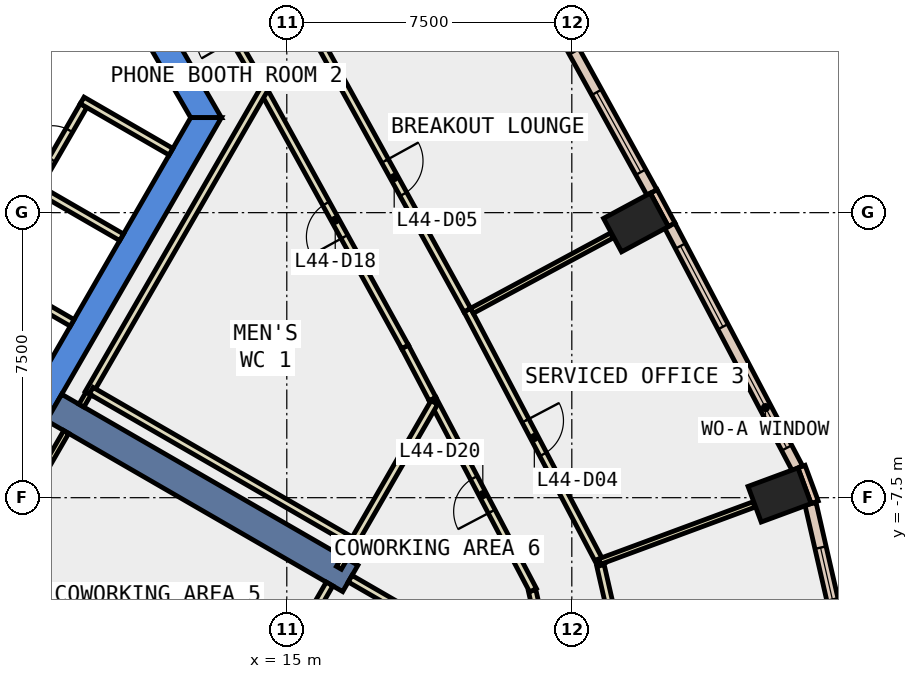
"""IFC4 building model, lengths in metres.
Left out: names, types, materials, properties, quantities, classifications, styles, units other than length and angle.
Written with IfcOpenShell. Run it as: python <this file> out.ifc"""

import sys

from ifc_helpers import new_model, si_unit, direction, frame, frame_2d, origin, origin_2d, place, context, subcontext, project, spatial, polyline, rectangle, outline, extrude, element, fill, save


model = new_model("IFC4")
c1 = context("Model", 3, precision=1e-05, world=origin(), true_north=direction((0.0, 1.0)))
c2 = subcontext(c1, "Body", "Model", "MODEL_VIEW")
j1 = project(units=[si_unit("LENGTHUNIT", "METRE"), si_unit("PLANEANGLEUNIT", "RADIAN")], contexts=[c1])
p1 = place(None, origin())
s1 = spatial("IfcSite", under=j1, at=p1, CompositionType="ELEMENT")
p2 = place(p1, origin())
s2 = spatial("IfcBuilding", under=s1, at=p2, CompositionType="ELEMENT")
p3 = place(p2, frame((0.0, 0.0, 198.2)))
s3 = spatial("IfcBuildingStorey", under=s2, at=p3, CompositionType="ELEMENT", Elevation=198.2)
for number, where, z_axis, x_axis in (
    (1, (27.967, -7.429, -0.4), (0.0, 0.0, 1.0), (-0.347, 0.938, 0.0)),
    (2, (24.188, -0.259, -0.4), (0.0, 0.0, 1.0), (-0.474, 0.88, 0.0)),
):
    element("IfcColumn", number, at=place(p3, frame(where, z_axis=z_axis, x_axis=x_axis)), inside=s3, PredefinedType="COLUMN", context=c2, shape_type="SweptSolid", body=[
        extrude(rectangle(XDim=1.0, YDim=1.4, at=origin_2d()), origin(), (0.0, 0.0, 1.0), 4.2),
    ])
p4 = place(p3, frame((0.0, 0.0, -0.4)))
e3 = element("IfcWall", 3, at=p4, inside=s3, PredefinedType="SHEAR", context=c2, shape_type="SweptSolid", body=[
    extrude(outline(polyline([(8.084, 11.498), (7.478, 11.148), (12.471, 2.5), (13.279, 2.5), (8.084, 11.498)])), origin(), (0.0, 0.0, 1.0), 4.2),
])
p5 = place(p3, frame((0.0, 0.0, -0.4)))
e4 = element("IfcWall", 4, at=p5, inside=s3, PredefinedType="SHEAR", context=c2, shape_type="SweptSolid", body=[
    extrude(outline(polyline([(6.64, -9.0), (13.279, 2.5), (12.471, 2.5), (6.235, -8.3), (6.64, -9.0)])), origin(), (0.0, 0.0, 1.0), 4.2),
])
p6 = place(p3, frame((8.877, -5.125, -0.4), z_axis=(0.0, 0.0, 1.0), x_axis=(0.866017533419, -0.500013631625, 0.0)))
e5 = element("IfcWall", 5, at=p6, inside=s3, PredefinedType="SHEAR", context=c2, shape_type="SweptSolid", body=[
    extrude(rectangle(XDim=9.0, YDim=0.8, at=frame_2d((4.5, 0.0))), origin(), (0.0, 0.0, 1.0), 4.2),
])
p7 = place(p3, frame((28.891, -7.621, 0.0), z_axis=(0.0, 0.0, 1.0), x_axis=(-0.347107644204, 0.937825294677, 0.0)))
e6 = element("IfcWall", 6, at=p7, inside=s3, PredefinedType="STANDARD", context=c2, shape_type="SweptSolid", body=[
    extrude(rectangle(XDim=1.0, YDim=0.2, at=frame_2d((0.5, 0.0))), origin(), (0.0, 0.0, 1.0), 3.8),
])
p8 = place(p3, frame((25.129, -0.32, 0.0), z_axis=(0.0, 0.0, 1.0), x_axis=(-0.473663196434, 0.88070606694, 0.0)))
e7 = element("IfcWall", 7, at=p8, inside=s3, PredefinedType="STANDARD", context=c2, shape_type="SweptSolid", body=[
    extrude(rectangle(XDim=1.0, YDim=0.2, at=frame_2d((0.5, 0.0))), origin(), (0.0, 0.0, 1.0), 3.8),
])
p9 = place(p3, frame((29.621, -11.332, 0.0), z_axis=(0.0, 0.0, 1.0), x_axis=(-0.223013094864, 0.974815448954, 0.0)))
e8 = element("IfcWall", 8, at=p9, inside=s3, PredefinedType="STANDARD", context=c2, shape_type="SweptSolid", body=[
    extrude(rectangle(XDim=3.767, YDim=0.3, at=frame_2d((1.884, 0.0))), origin(), (0.0, 0.0, 1.0), 3.8),
])
p10 = place(p9, frame((1.183, 0.0, 0.9)))
e9 = element("IfcOpeningElement", 9, at=p10, cuts=e8, PredefinedType="OPENING", context=c2, shape_type="SweptSolid", body=[
    extrude(rectangle(XDim=1.4, YDim=2.6, at=frame_2d((0.7, 1.3))), frame((0.0, 0.16, 0.0), z_axis=(0.0, -1.0, 0.0), x_axis=(1.0, 0.0, 0.0)), (0.0, 0.0, 1.0), 0.32),
])
p11 = place(p3, frame((28.435, -6.724, 0.0), z_axis=(0.0, 0.0, 1.0), x_axis=(-0.465478369088, 0.885059256723, 0.0)))
e10 = element("IfcWall", 10, at=p11, inside=s3, PredefinedType="STANDARD", context=c2, shape_type="SweptSolid", body=[
    extrude(rectangle(XDim=7.208, YDim=0.3, at=frame_2d((3.604, 0.0))), origin(), (0.0, 0.0, 1.0), 3.8),
])
p12 = place(p11, frame((0.602, 0.0, 0.9)))
e11 = element("IfcOpeningElement", 11, at=p12, cuts=e10, PredefinedType="OPENING", context=c2, shape_type="SweptSolid", body=[
    extrude(rectangle(XDim=2.4, YDim=2.6, at=frame_2d((1.2, 1.3))), frame((0.0, 0.16, 0.0), z_axis=(0.0, -1.0, 0.0), x_axis=(1.0, 0.0, 0.0)), (0.0, 0.0, 1.0), 0.32),
])
p13 = place(p11, frame((4.206, 0.0, 0.9)))
e12 = element("IfcOpeningElement", 12, at=p13, cuts=e10, PredefinedType="OPENING", context=c2, shape_type="SweptSolid", body=[
    extrude(rectangle(XDim=2.4, YDim=2.6, at=frame_2d((1.2, 1.3))), frame((0.0, 0.16, 0.0), z_axis=(0.0, -1.0, 0.0), x_axis=(1.0, 0.0, 0.0)), (0.0, 0.0, 1.0), 0.32),
])
p14 = place(p3, frame((24.607, 0.534, 0.0), z_axis=(0.0, 0.0, 1.0), x_axis=(-0.482862185961, 0.875696356832, 0.0)))
e13 = element("IfcWall", 13, at=p14, inside=s3, PredefinedType="STANDARD", context=c2, shape_type="SweptSolid", body=[
    extrude(rectangle(XDim=7.23, YDim=0.3, at=frame_2d((3.615, 0.0))), origin(), (0.0, 0.0, 1.0), 3.8),
])
p15 = place(p14, frame((0.607, 0.0, 0.9)))
e14 = element("IfcOpeningElement", 14, at=p15, cuts=e13, PredefinedType="OPENING", context=c2, shape_type="SweptSolid", body=[
    extrude(rectangle(XDim=2.4, YDim=2.6, at=frame_2d((1.2, 1.3))), frame((0.0, 0.16, 0.0), z_axis=(0.0, -1.0, 0.0), x_axis=(1.0, 0.0, 0.0)), (0.0, 0.0, 1.0), 0.32),
])
p16 = place(p14, frame((4.222, 0.0, 0.9)))
e15 = element("IfcOpeningElement", 15, at=p16, cuts=e13, PredefinedType="OPENING", context=c2, shape_type="SweptSolid", body=[
    extrude(rectangle(XDim=2.4, YDim=2.6, at=frame_2d((1.2, 1.3))), frame((0.0, 0.16, 0.0), z_axis=(0.0, -1.0, 0.0), x_axis=(1.0, 0.0, 0.0)), (0.0, 0.0, 1.0), 0.32),
])
p17 = place(p3, frame((14.213, 3.543, 0.0), z_axis=(0.0, 0.0, 1.0), x_axis=(-0.500182898346, 0.865919781621, 0.0)))
e16 = element("IfcWall", 16, at=p17, inside=s3, PredefinedType="PARTITIONING", context=c2, shape_type="SweptSolid", body=[
    extrude(rectangle(XDim=3.35, YDim=0.2, at=frame_2d((1.675, 0.0))), origin(), (0.0, 0.0, 1.0), 3.8),
])
p18 = place(p17, frame((1.175, 0.0, 0.0)))
e17 = element("IfcOpeningElement", 17, at=p18, cuts=e16, PredefinedType="OPENING", context=c2, shape_type="SweptSolid", body=[
    extrude(rectangle(XDim=1.0, YDim=2.1, at=frame_2d((0.5, 1.05))), frame((0.0, 0.11, 0.0), z_axis=(0.0, -1.0, 0.0), x_axis=(1.0, 0.0, 0.0)), (0.0, 0.0, 1.0), 0.22),
])
p19 = place(p3, frame((18.836, -4.906, 0.0), z_axis=(0.0, 0.0, 1.0), x_axis=(-0.465843561357, 0.884867095299, 0.0)))
e18 = element("IfcWall", 18, at=p19, inside=s3, PredefinedType="PARTITIONING", context=c2, shape_type="SweptSolid", body=[
    extrude(rectangle(XDim=1.554, YDim=0.2, at=frame_2d((0.777, 0.0))), origin(), (0.0, 0.0, 1.0), 3.8),
])
p20 = place(p3, frame((18.112, -3.531, 0.0), z_axis=(0.0, 0.0, 1.0), x_axis=(-0.482800061144, 0.875730609811, 0.0)))
e19 = element("IfcWall", 19, at=p20, inside=s3, PredefinedType="PARTITIONING", context=c2, shape_type="SweptSolid", body=[
    extrude(rectangle(XDim=7.612, YDim=0.2, at=frame_2d((3.806, 0.0))), origin(), (0.0, 0.0, 1.0), 3.8),
])
p21 = place(p20, frame((3.306, 0.0, 0.0)))
e20 = element("IfcOpeningElement", 20, at=p21, cuts=e19, PredefinedType="OPENING", context=c2, shape_type="SweptSolid", body=[
    extrude(rectangle(XDim=1.0, YDim=2.1, at=frame_2d((0.5, 1.05))), frame((0.0, 0.11, 0.0), z_axis=(0.0, -1.0, 0.0), x_axis=(1.0, 0.0, 0.0)), (0.0, 0.0, 1.0), 0.22),
])
p22 = place(p3, frame((21.866, -11.737, 0.0), z_axis=(0.0, 0.0, 1.0), x_axis=(-0.222871656966, 0.974847795567, 0.0)))
e21 = element("IfcWall", 21, at=p22, inside=s3, PredefinedType="PARTITIONING", context=c2, shape_type="SweptSolid", body=[
    extrude(rectangle(XDim=1.839, YDim=0.2, at=frame_2d((0.919, 0.0))), origin(), (0.0, 0.0, 1.0), 3.8),
])
p23 = place(p3, frame((21.48, -9.935, 0.0), z_axis=(0.0, 0.0, 1.0), x_axis=(-0.465356775138, 0.885123195851, 0.0)))
e22 = element("IfcWall", 22, at=p23, inside=s3, PredefinedType="PARTITIONING", context=c2, shape_type="SweptSolid", body=[
    extrude(rectangle(XDim=5.682, YDim=0.2, at=frame_2d((2.841, 0.0))), origin(), (0.0, 0.0, 1.0), 3.8),
])
p24 = place(p23, frame((2.341, 0.0, 0.0)))
e23 = element("IfcOpeningElement", 23, at=p24, cuts=e22, PredefinedType="OPENING", context=c2, shape_type="SweptSolid", body=[
    extrude(rectangle(XDim=1.0, YDim=2.1, at=frame_2d((0.5, 1.05))), frame((0.0, 0.11, 0.0), z_axis=(0.0, -1.0, 0.0), x_axis=(1.0, 0.0, 0.0)), (0.0, 0.0, 1.0), 0.22),
])
p25 = place(p3, frame((23.253, -9.279, 0.0), z_axis=(0.0, 0.0, 1.0), x_axis=(0.222909903746, -0.974839050722, 0.0)))
e24 = element("IfcWall", 24, at=p25, inside=s3, PredefinedType="PARTITIONING", context=c2, shape_type="SweptSolid", body=[
    extrude(rectangle(XDim=2.571, YDim=0.2, at=frame_2d((1.285, 0.0))), origin(), (0.0, 0.0, 1.0), 3.8),
])
p26 = place(p3, frame((19.75, -2.563, 0.0), z_axis=(0.0, 0.0, 1.0), x_axis=(0.465444987791, -0.885076812113, 0.0)))
e25 = element("IfcWall", 25, at=p26, inside=s3, PredefinedType="PARTITIONING", context=c2, shape_type="SweptSolid", body=[
    extrude(rectangle(XDim=7.578, YDim=0.2, at=frame_2d((3.789, 0.0))), origin(), (0.0, 0.0, 1.0), 3.8),
])
p27 = place(p26, frame((3.289, 0.0, 0.0)))
e26 = element("IfcOpeningElement", 26, at=p27, cuts=e25, PredefinedType="OPENING", context=c2, shape_type="SweptSolid", body=[
    extrude(rectangle(XDim=1.0, YDim=2.1, at=frame_2d((0.5, 1.05))), frame((0.0, 0.11, 0.0), z_axis=(0.0, -1.0, 0.0), x_axis=(1.0, 0.0, 0.0)), (0.0, 0.0, 1.0), 0.22),
])
p28 = place(p3, frame((15.831, 4.542, 0.0), z_axis=(0.0, 0.0, 1.0), x_axis=(0.482835531749, -0.875711053533, 0.0)))
e27 = element("IfcWall", 27, at=p28, inside=s3, PredefinedType="PARTITIONING", context=c2, shape_type="SweptSolid", body=[
    extrude(rectangle(XDim=8.115, YDim=0.2, at=frame_2d((4.057, 0.0))), origin(), (0.0, 0.0, 1.0), 3.8),
])
p29 = place(p28, frame((3.632, 0.0, 0.0)))
e28 = element("IfcOpeningElement", 28, at=p29, cuts=e27, PredefinedType="OPENING", context=c2, shape_type="SweptSolid", body=[
    extrude(rectangle(XDim=1.0, YDim=2.1, at=frame_2d((0.5, 1.05))), frame((0.0, 0.11, 0.0), z_axis=(0.0, -1.0, 0.0), x_axis=(1.0, 0.0, 0.0)), (0.0, 0.0, 1.0), 0.22),
])
p30 = place(p3, frame((7.188, -1.65, 0.0), z_axis=(0.0, 0.0, 1.0), x_axis=(0.866022959057, -0.500004234368, 0.0)))
e29 = element("IfcWall", 29, at=p30, inside=s3, PredefinedType="PARTITIONING", context=c2, shape_type="SweptSolid", body=[
    extrude(rectangle(XDim=2.5, YDim=0.2, at=frame_2d((1.25, 0.0))), origin(), (0.0, 0.0, 1.0), 3.8),
])
p31 = place(p30, frame((0.75, 0.0, 0.0)))
e30 = element("IfcOpeningElement", 30, at=p31, cuts=e29, PredefinedType="OPENING", context=c2, shape_type="SweptSolid", body=[
    extrude(rectangle(XDim=0.9, YDim=2.1, at=frame_2d((0.45, 1.05))), frame((0.0, 0.11, 0.0), z_axis=(0.0, -1.0, 0.0), x_axis=(1.0, 0.0, 0.0)), (0.0, 0.0, 1.0), 0.22),
])
p32 = place(p3, frame((10.653, -0.648, 0.0), z_axis=(0.0, 0.0, 1.0), x_axis=(-0.866036505625, 0.499980770555, 0.0)))
e31 = element("IfcWall", 31, at=p32, inside=s3, PredefinedType="PARTITIONING", context=c2, shape_type="SweptSolid", body=[
    extrude(rectangle(XDim=2.7, YDim=0.2, at=frame_2d((1.35, 0.0))), origin(), (0.0, 0.0, 1.0), 3.8),
])
p33 = place(p3, frame((8.451, 0.738, 0.0), z_axis=(0.0, 0.0, 1.0), x_axis=(0.499913221443, 0.866075499611, 0.0)))
e32 = element("IfcWall", 32, at=p33, inside=s3, PredefinedType="PARTITIONING", context=c2, shape_type="SweptSolid", body=[
    extrude(rectangle(XDim=2.4, YDim=0.2, at=frame_2d((1.2, 0.0))), origin(), (0.0, 0.0, 1.0), 3.8),
])
p34 = place(p33, frame((0.75, 0.0, 0.0)))
e33 = element("IfcOpeningElement", 33, at=p34, cuts=e32, PredefinedType="OPENING", context=c2, shape_type="SweptSolid", body=[
    extrude(rectangle(XDim=0.9, YDim=2.1, at=frame_2d((0.45, 1.05))), frame((0.0, 0.11, 0.0), z_axis=(0.0, -1.0, 0.0), x_axis=(1.0, 0.0, 0.0)), (0.0, 0.0, 1.0), 0.22),
])
p35 = place(p3, frame((9.615, 2.953, 0.0), z_axis=(0.0, 0.0, 1.0), x_axis=(0.866013897511, -0.50001992892, 0.0)))
e34 = element("IfcWall", 34, at=p35, inside=s3, PredefinedType="PARTITIONING", context=c2, shape_type="SweptSolid", body=[
    extrude(rectangle(XDim=2.7, YDim=0.2, at=frame_2d((1.35, 0.0))), origin(), (0.0, 0.0, 1.0), 3.8),
])
p36 = place(p3, frame((7.283, -9.086, 0.0), z_axis=(0.0, 0.0, 1.0), x_axis=(0.499843936326, 0.866115488442, 0.0)))
e35 = element("IfcWall", 35, at=p36, inside=s3, PredefinedType="PARTITIONING", context=c2, shape_type="SweptSolid", body=[
    extrude(rectangle(XDim=3.827, YDim=0.15, at=frame_2d((1.914, 0.0))), origin(), (0.0, 0.0, 1.0), 3.8),
])
p37 = place(p3, frame((9.781, -4.758, 0.0), z_axis=(0.0, 0.0, 1.0), x_axis=(0.50003174578, 0.866007074574, 0.0)))
e36 = element("IfcWall", 36, at=p37, inside=s3, PredefinedType="PARTITIONING", context=c2, shape_type="SweptSolid", body=[
    extrude(rectangle(XDim=9.315, YDim=0.2, at=frame_2d((4.658, 0.0))), origin(), (0.0, 0.0, 1.0), 3.8),
])
p38 = place(p3, frame((9.853, -4.684, 0.0), z_axis=(0.0, 0.0, 1.0), x_axis=(0.865999791918, -0.500044358431, 0.0)))
e37 = element("IfcWall", 37, at=p38, inside=s3, PredefinedType="PARTITIONING", context=c2, shape_type="SweptSolid", body=[
    extrude(rectangle(XDim=8.075, YDim=0.2, at=frame_2d((4.038, 0.0))), origin(), (0.0, 0.0, 1.0), 3.8),
])
p39 = place(p3, frame((16.125, -9.771, 0.0), z_axis=(0.0, 0.0, 1.0), x_axis=(-0.500030759312, -0.866007644159, 0.0)))
e38 = element("IfcWall", 38, at=p39, inside=s3, PredefinedType="PARTITIONING", context=c2, shape_type="SweptSolid", body=[
    extrude(rectangle(XDim=4.73, YDim=0.2, at=frame_2d((2.365, 0.0))), origin(), (0.0, 0.0, 1.0), 3.8),
])
p40 = place(p3, frame((16.71, -8.758, 0.0), z_axis=(0.0, 0.0, 1.0), x_axis=(-0.500013496215, -0.866017611601, 0.0)))
e39 = element("IfcWall", 39, at=p40, inside=s3, PredefinedType="PARTITIONING", context=c2, shape_type="SweptSolid", body=[
    extrude(rectangle(XDim=0.678, YDim=0.15, at=frame_2d((0.339, 0.0))), origin(), (0.0, 0.0, 1.0), 3.8),
])
p41 = place(p3, frame((18.882, -4.995, 0.0), z_axis=(0.0, 0.0, 1.0), x_axis=(-0.499895813511, -0.866085547527, 0.0)))
e40 = element("IfcWall", 40, at=p41, inside=s3, PredefinedType="PARTITIONING", context=c2, shape_type="SweptSolid", body=[
    extrude(rectangle(XDim=4.145, YDim=0.2, at=frame_2d((2.073, 0.0))), origin(), (0.0, 0.0, 1.0), 3.8),
])
p42 = place(p3, frame((16.667, -9.631, 0.0), z_axis=(0.0, 0.0, 1.0), x_axis=(0.866032775405, -0.499987231761, 0.0)))
e41 = element("IfcWall", 41, at=p42, inside=s3, PredefinedType="PARTITIONING", context=c2, shape_type="SweptSolid", body=[
    extrude(rectangle(XDim=5.8, YDim=0.2, at=frame_2d((2.9, 0.0))), origin(), (0.0, 0.0, 1.0), 3.8),
])
p43 = place(p3, frame((23.231, -9.182, 0.0), z_axis=(0.0, 0.0, 1.0), x_axis=(0.937835784628, 0.34707930084, 0.0)))
e42 = element("IfcWall", 42, at=p43, inside=s3, PredefinedType="PARTITIONING", context=c2, shape_type="SweptSolid", body=[
    extrude(rectangle(XDim=4.33, YDim=0.15, at=frame_2d((2.165, 0.0))), origin(), (0.0, 0.0, 1.0), 3.8),
])
p44 = place(p3, frame((19.873, -2.582, 0.0), z_axis=(0.0, 0.0, 1.0), x_axis=(0.880480475723, 0.474082410421, 0.0)))
e43 = element("IfcWall", 43, at=p44, inside=s3, PredefinedType="PARTITIONING", context=c2, shape_type="SweptSolid", body=[
    extrude(rectangle(XDim=4.181, YDim=0.15, at=frame_2d((2.09, 0.0))), origin(), (0.0, 0.0, 1.0), 3.8),
])
p45 = place(p3, frame((9.596, -5.078, 0.0), z_axis=(0.0, 0.0, 1.0), x_axis=(0.500827895298, 0.86554689029, 0.0)))
e44 = element("IfcWall", 44, at=p45, inside=s3, PredefinedType="PARTITIONING", context=c2, shape_type="SweptSolid", body=[
    extrude(rectangle(XDim=0.369, YDim=0.15, at=frame_2d((0.185, 0.0))), origin(), (0.0, 0.0, 1.0), 3.8),
])
p46 = place(p10, origin())
e45 = element("IfcWindow", 45, at=p46, inside=s3, PartitioningType="SINGLE_PANEL", PredefinedType="WINDOW", context=c2, shape_type="SweptSolid", body=[
    extrude(rectangle(XDim=1.4, YDim=2.6, at=frame_2d((0.7, 1.3))), frame((0.0, 0.03, 0.0), z_axis=(0.0, -1.0, 0.0), x_axis=(1.0, 0.0, 0.0)), (0.0, 0.0, 1.0), 0.06),
])
fill(e9, e45)
p47 = place(p12, origin())
e46 = element("IfcWindow", 46, at=p47, inside=s3, PartitioningType="SINGLE_PANEL", PredefinedType="WINDOW", context=c2, shape_type="SweptSolid", body=[
    extrude(rectangle(XDim=2.4, YDim=2.6, at=frame_2d((1.2, 1.3))), frame((0.0, 0.03, 0.0), z_axis=(0.0, -1.0, 0.0), x_axis=(1.0, 0.0, 0.0)), (0.0, 0.0, 1.0), 0.06),
])
fill(e11, e46)
p48 = place(p13, origin())
e47 = element("IfcWindow", 47, at=p48, inside=s3, PartitioningType="SINGLE_PANEL", PredefinedType="WINDOW", context=c2, shape_type="SweptSolid", body=[
    extrude(rectangle(XDim=2.4, YDim=2.6, at=frame_2d((1.2, 1.3))), frame((0.0, 0.03, 0.0), z_axis=(0.0, -1.0, 0.0), x_axis=(1.0, 0.0, 0.0)), (0.0, 0.0, 1.0), 0.06),
])
fill(e12, e47)
p49 = place(p15, origin())
e48 = element("IfcWindow", 48, at=p49, inside=s3, PartitioningType="SINGLE_PANEL", PredefinedType="WINDOW", context=c2, shape_type="SweptSolid", body=[
    extrude(rectangle(XDim=2.4, YDim=2.6, at=frame_2d((1.2, 1.3))), frame((0.0, 0.03, 0.0), z_axis=(0.0, -1.0, 0.0), x_axis=(1.0, 0.0, 0.0)), (0.0, 0.0, 1.0), 0.06),
])
fill(e14, e48)
p50 = place(p16, origin())
e49 = element("IfcWindow", 49, at=p50, inside=s3, PartitioningType="SINGLE_PANEL", PredefinedType="WINDOW", context=c2, shape_type="SweptSolid", body=[
    extrude(rectangle(XDim=2.4, YDim=2.6, at=frame_2d((1.2, 1.3))), frame((0.0, 0.03, 0.0), z_axis=(0.0, -1.0, 0.0), x_axis=(1.0, 0.0, 0.0)), (0.0, 0.0, 1.0), 0.06),
])
fill(e15, e49)
p51 = place(p27, origin())
e50 = element("IfcDoor", 50, at=p51, inside=s3, OperationType="SINGLE_SWING_LEFT", PredefinedType="DOOR", context=c2, shape_type="SweptSolid", body=[
    extrude(rectangle(XDim=1.0, YDim=2.1, at=frame_2d((0.5, 1.05))), frame((0.0, 0.025, 0.0), z_axis=(0.0, -1.0, 0.0), x_axis=(1.0, 0.0, 0.0)), (0.0, 0.0, 1.0), 0.05),
])
fill(e26, e50)
p52 = place(p29, origin())
e51 = element("IfcDoor", 51, at=p52, inside=s3, OperationType="SINGLE_SWING_RIGHT", PredefinedType="DOOR", context=c2, shape_type="SweptSolid", body=[
    extrude(rectangle(XDim=1.0, YDim=2.1, at=frame_2d((0.5, 1.05))), frame((0.0, 0.025, 0.0), z_axis=(0.0, -1.0, 0.0), x_axis=(1.0, 0.0, 0.0)), (0.0, 0.0, 1.0), 0.05),
])
fill(e28, e51)
p53 = place(p21, origin())
e52 = element("IfcDoor", 52, at=p53, inside=s3, OperationType="SINGLE_SWING_LEFT", PredefinedType="DOOR", context=c2, shape_type="SweptSolid", body=[
    extrude(rectangle(XDim=1.0, YDim=2.1, at=frame_2d((0.5, 1.05))), frame((0.0, 0.025, 0.0), z_axis=(0.0, -1.0, 0.0), x_axis=(1.0, 0.0, 0.0)), (0.0, 0.0, 1.0), 0.05),
])
fill(e20, e52)
p54 = place(p24, origin())
e53 = element("IfcDoor", 53, at=p54, inside=s3, OperationType="SINGLE_SWING_LEFT", PredefinedType="DOOR", context=c2, shape_type="SweptSolid", body=[
    extrude(rectangle(XDim=1.0, YDim=2.1, at=frame_2d((0.5, 1.05))), frame((0.0, 0.025, 0.0), z_axis=(0.0, -1.0, 0.0), x_axis=(1.0, 0.0, 0.0)), (0.0, 0.0, 1.0), 0.05),
])
fill(e23, e53)
p55 = place(p34, origin())
e54 = element("IfcDoor", 54, at=p55, inside=s3, OperationType="SINGLE_SWING_LEFT", PredefinedType="DOOR", context=c2, shape_type="SweptSolid", body=[
    extrude(rectangle(XDim=0.9, YDim=2.1, at=frame_2d((0.45, 1.05))), frame((0.0, 0.025, 0.0), z_axis=(0.0, -1.0, 0.0), x_axis=(1.0, 0.0, 0.0)), (0.0, 0.0, 1.0), 0.05),
])
fill(e33, e54)
save(model, sys.argv[1])
